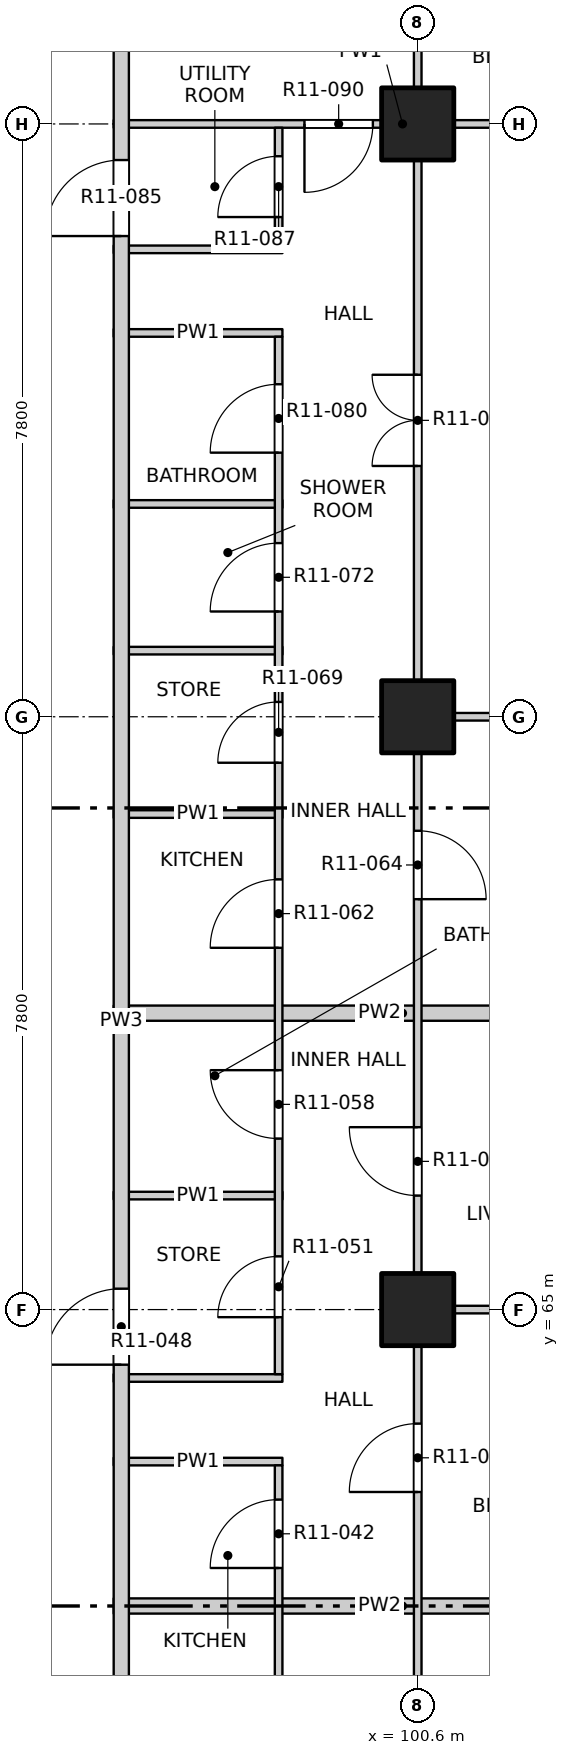
"""IFC4 building model, lengths in metres.
Left out: names, types, materials, properties, quantities, classifications, styles, units other than length and angle.
Written with IfcOpenShell. Run it as: python <this file> out.ifc"""

import sys

from ifc_helpers import new_model, si_unit, direction, frame, frame_2d, origin, origin_2d, place, context, subcontext, project, spatial, rectangle, extrude, element, fill, save


model = new_model("IFC4")
c1 = context("Model", 3, precision=1e-05, world=origin(), true_north=direction((0.0, 1.0)))
c2 = subcontext(c1, "Body", "Model", "MODEL_VIEW")
j1 = project(units=[si_unit("LENGTHUNIT", "METRE"), si_unit("PLANEANGLEUNIT", "RADIAN")], contexts=[c1])
p1 = place(None, origin())
s1 = spatial("IfcSite", under=j1, at=p1, CompositionType="ELEMENT")
p2 = place(p1, origin())
s2 = spatial("IfcBuilding", under=s1, at=p2, CompositionType="ELEMENT")
p3 = place(p2, frame((0.0, 0.0, 130.5)))
s3 = spatial("IfcBuildingStorey", under=s2, at=p3, CompositionType="ELEMENT", Elevation=130.5)
for number, where, z_axis, x_axis in (
    (1, (100.6, 65.0, -0.25), (0.0, 0.0, 1.0), (1.0, 0.0, 0.0)),
    (2, (100.6, 72.8, -0.25), (0.0, 0.0, 1.0), (1.0, 0.0, 0.0)),
    (3, (100.6, 80.6, -0.25), (0.0, 0.0, 1.0), (1.0, 0.0, 0.0)),
):
    element("IfcColumn", number, at=place(p3, frame(where, z_axis=z_axis, x_axis=x_axis)), inside=s3, PredefinedType="COLUMN", context=c2, shape_type="SweptSolid", body=[
        extrude(rectangle(XDim=0.95, YDim=0.95, at=origin_2d()), origin(), (0.0, 0.0, 1.0), 3.4),
    ])
p4 = place(p3, frame((96.6, 61.1, 0.0), z_axis=(0.0, 0.0, 1.0), x_axis=(1.0, 0.0, 0.0)))
e4 = element("IfcWall", 4, at=p4, inside=s3, PredefinedType="PARTITIONING", context=c2, shape_type="SweptSolid", body=[
    extrude(rectangle(XDim=7.6, YDim=0.2, at=frame_2d((3.8, 0.0))), origin(), (0.0, 0.0, 1.0), 2.55),
])
for number, where, z_axis, x_axis in (
    (5, (96.6, 63.0, 0.0), (0.0, 0.0, 1.0), (1.0, 0.0, 0.0)),
    (6, (96.6, 64.1, 0.0), (0.0, 0.0, 1.0), (1.0, 0.0, 0.0)),
):
    element("IfcWall", number, at=place(p3, frame(where, z_axis=z_axis, x_axis=x_axis)), inside=s3, PredefinedType="PARTITIONING", context=c2, shape_type="SweptSolid", body=[
        extrude(rectangle(XDim=2.22, YDim=0.1, at=frame_2d((1.11, 0.0))), origin(), (0.0, 0.0, 1.0), 3.15),
    ])
p5 = place(p3, frame((100.55, 65.0, 0.0), z_axis=(0.0, 0.0, 1.0), x_axis=(1.0, 0.0, 0.0)))
e7 = element("IfcWall", 7, at=p5, inside=s3, PredefinedType="PARTITIONING", context=c2, shape_type="SweptSolid", body=[
    extrude(rectangle(XDim=3.65, YDim=0.1, at=frame_2d((1.825, 0.0))), origin(), (0.0, 0.0, 1.0), 3.15),
])
p6 = place(p3, frame((96.6, 66.5, 0.0), z_axis=(0.0, 0.0, 1.0), x_axis=(1.0, 0.0, 0.0)))
e8 = element("IfcWall", 8, at=p6, inside=s3, PredefinedType="PARTITIONING", context=c2, shape_type="SweptSolid", body=[
    extrude(rectangle(XDim=2.22, YDim=0.1, at=frame_2d((1.11, 0.0))), origin(), (0.0, 0.0, 1.0), 3.15),
])
p7 = place(p3, frame((96.6, 68.9, 0.0), z_axis=(0.0, 0.0, 1.0), x_axis=(1.0, 0.0, 0.0)))
e9 = element("IfcWall", 9, at=p7, inside=s3, PredefinedType="PARTITIONING", context=c2, shape_type="SweptSolid", body=[
    extrude(rectangle(XDim=7.6, YDim=0.2, at=frame_2d((3.8, 0.0))), origin(), (0.0, 0.0, 1.0), 2.55),
])
p8 = place(p3, frame((96.6, 71.52, 0.0), z_axis=(0.0, 0.0, 1.0), x_axis=(1.0, 0.0, 0.0)))
e10 = element("IfcWall", 10, at=p8, inside=s3, PredefinedType="PARTITIONING", context=c2, shape_type="SweptSolid", body=[
    extrude(rectangle(XDim=2.22, YDim=0.1, at=frame_2d((1.11, 0.0))), origin(), (0.0, 0.0, 1.0), 3.15),
])
p9 = place(p3, frame((100.55, 72.8, 0.0), z_axis=(0.0, 0.0, 1.0), x_axis=(1.0, 0.0, 0.0)))
e11 = element("IfcWall", 11, at=p9, inside=s3, PredefinedType="PARTITIONING", context=c2, shape_type="SweptSolid", body=[
    extrude(rectangle(XDim=3.65, YDim=0.1, at=frame_2d((1.825, 0.0))), origin(), (0.0, 0.0, 1.0), 3.15),
])
for number, where, z_axis, x_axis in (
    (12, (96.6, 73.67, 0.0), (0.0, 0.0, 1.0), (1.0, 0.0, 0.0)),
    (13, (96.6, 75.6, 0.0), (0.0, 0.0, 1.0), (1.0, 0.0, 0.0)),
    (14, (96.6, 77.85, 0.0), (0.0, 0.0, 1.0), (1.0, 0.0, 0.0)),
    (15, (96.6, 78.95, 0.0), (0.0, 0.0, 1.0), (1.0, 0.0, 0.0)),
):
    element("IfcWall", number, at=place(p3, frame(where, z_axis=z_axis, x_axis=x_axis)), inside=s3, PredefinedType="PARTITIONING", context=c2, shape_type="SweptSolid", body=[
        extrude(rectangle(XDim=2.22, YDim=0.1, at=frame_2d((1.11, 0.0))), origin(), (0.0, 0.0, 1.0), 3.15),
    ])
p10 = place(p3, frame((96.6, 80.6, 0.0), z_axis=(0.0, 0.0, 1.0), x_axis=(1.0, 0.0, 0.0)))
e16 = element("IfcWall", 16, at=p10, inside=s3, PredefinedType="PARTITIONING", context=c2, shape_type="SweptSolid", body=[
    extrude(rectangle(XDim=7.6, YDim=0.1, at=frame_2d((3.8, 0.0))), origin(), (0.0, 0.0, 1.0), 3.15),
])
p11 = place(p10, frame((2.51, 0.0, 0.0)))
e17 = element("IfcOpeningElement", 17, at=p11, cuts=e16, PredefinedType="OPENING", context=c2, shape_type="SweptSolid", body=[
    extrude(rectangle(XDim=0.9, YDim=2.1, at=frame_2d((0.45, 1.05))), frame((0.0, 0.06, 0.0), z_axis=(0.0, -1.0, 0.0), x_axis=(1.0, 0.0, 0.0)), (0.0, 0.0, 1.0), 0.12),
])
p12 = place(p3, frame((96.7, 53.4, 0.0), z_axis=(0.0, 0.0, 1.0), x_axis=(0.0, 1.0, 0.0)))
e18 = element("IfcWall", 18, at=p12, inside=s3, PredefinedType="PARTITIONING", context=c2, shape_type="SweptSolid", body=[
    extrude(rectangle(XDim=30.8, YDim=0.2, at=frame_2d((15.4, 0.0))), origin(), (0.0, 0.0, 1.0), 3.15),
])
p13 = place(p12, frame((1.875, 0.0, 0.0)))
e19 = element("IfcOpeningElement", 19, at=p13, cuts=e18, PredefinedType="OPENING", context=c2, shape_type="SweptSolid", body=[
    extrude(rectangle(XDim=1.0, YDim=2.1, at=frame_2d((0.5, 1.05))), frame((0.0, 0.11, 0.0), z_axis=(0.0, -1.0, 0.0), x_axis=(1.0, 0.0, 0.0)), (0.0, 0.0, 1.0), 0.22),
])
p14 = place(p12, frame((10.875, 0.0, 0.0)))
e20 = element("IfcOpeningElement", 20, at=p14, cuts=e18, PredefinedType="OPENING", context=c2, shape_type="SweptSolid", body=[
    extrude(rectangle(XDim=1.0, YDim=2.1, at=frame_2d((0.5, 1.05))), frame((0.0, 0.11, 0.0), z_axis=(0.0, -1.0, 0.0), x_axis=(1.0, 0.0, 0.0)), (0.0, 0.0, 1.0), 0.22),
])
p15 = place(p12, frame((25.725, 0.0, 0.0)))
e21 = element("IfcOpeningElement", 21, at=p15, cuts=e18, PredefinedType="OPENING", context=c2, shape_type="SweptSolid", body=[
    extrude(rectangle(XDim=1.0, YDim=2.1, at=frame_2d((0.5, 1.05))), frame((0.0, 0.11, 0.0), z_axis=(0.0, -1.0, 0.0), x_axis=(1.0, 0.0, 0.0)), (0.0, 0.0, 1.0), 0.22),
])
p16 = place(p3, frame((98.77, 55.15, 0.0), z_axis=(0.0, 0.0, 1.0), x_axis=(0.0, 1.0, 0.0)))
e22 = element("IfcWall", 22, at=p16, inside=s3, PredefinedType="PARTITIONING", context=c2, shape_type="SweptSolid", body=[
    extrude(rectangle(XDim=7.8, YDim=0.1, at=frame_2d((3.9, 0.0))), origin(), (0.0, 0.0, 1.0), 3.15),
])
p17 = place(p16, frame((0.74, 0.0, 0.0)))
e23 = element("IfcOpeningElement", 23, at=p17, cuts=e22, PredefinedType="OPENING", context=c2, shape_type="SweptSolid", body=[
    extrude(rectangle(XDim=0.9, YDim=2.1, at=frame_2d((0.45, 1.05))), frame((0.0, 0.06, 0.0), z_axis=(0.0, -1.0, 0.0), x_axis=(1.0, 0.0, 0.0)), (0.0, 0.0, 1.0), 0.12),
])
p18 = place(p16, frame((3.74, 0.0, 0.0)))
e24 = element("IfcOpeningElement", 24, at=p18, cuts=e22, PredefinedType="OPENING", context=c2, shape_type="SweptSolid", body=[
    extrude(rectangle(XDim=0.9, YDim=2.1, at=frame_2d((0.45, 1.05))), frame((0.0, 0.06, 0.0), z_axis=(0.0, -1.0, 0.0), x_axis=(1.0, 0.0, 0.0)), (0.0, 0.0, 1.0), 0.12),
])
p19 = place(p16, frame((6.45, 0.0, 0.0)))
e25 = element("IfcOpeningElement", 25, at=p19, cuts=e22, PredefinedType="OPENING", context=c2, shape_type="SweptSolid", body=[
    extrude(rectangle(XDim=0.9, YDim=2.1, at=frame_2d((0.45, 1.05))), frame((0.0, 0.06, 0.0), z_axis=(0.0, -1.0, 0.0), x_axis=(1.0, 0.0, 0.0)), (0.0, 0.0, 1.0), 0.12),
])
p20 = place(p3, frame((98.77, 64.15, 0.0), z_axis=(0.0, 0.0, 1.0), x_axis=(0.0, 1.0, 0.0)))
e26 = element("IfcWall", 26, at=p20, inside=s3, PredefinedType="PARTITIONING", context=c2, shape_type="SweptSolid", body=[
    extrude(rectangle(XDim=13.65, YDim=0.1, at=frame_2d((6.825, 0.0))), origin(), (0.0, 0.0, 1.0), 3.15),
])
p21 = place(p20, frame((0.75, 0.0, 0.0)))
e27 = element("IfcOpeningElement", 27, at=p21, cuts=e26, PredefinedType="OPENING", context=c2, shape_type="SweptSolid", body=[
    extrude(rectangle(XDim=0.8, YDim=2.1, at=frame_2d((0.4, 1.05))), frame((0.0, 0.06, 0.0), z_axis=(0.0, -1.0, 0.0), x_axis=(1.0, 0.0, 0.0)), (0.0, 0.0, 1.0), 0.12),
])
p22 = place(p20, frame((3.1, 0.0, 0.0)))
e28 = element("IfcOpeningElement", 28, at=p22, cuts=e26, PredefinedType="OPENING", context=c2, shape_type="SweptSolid", body=[
    extrude(rectangle(XDim=0.9, YDim=2.1, at=frame_2d((0.45, 1.05))), frame((0.0, 0.06, 0.0), z_axis=(0.0, -1.0, 0.0), x_axis=(1.0, 0.0, 0.0)), (0.0, 0.0, 1.0), 0.12),
])
p23 = place(p20, frame((5.61, 0.0, 0.0)))
e29 = element("IfcOpeningElement", 29, at=p23, cuts=e26, PredefinedType="OPENING", context=c2, shape_type="SweptSolid", body=[
    extrude(rectangle(XDim=0.9, YDim=2.1, at=frame_2d((0.45, 1.05))), frame((0.0, 0.06, 0.0), z_axis=(0.0, -1.0, 0.0), x_axis=(1.0, 0.0, 0.0)), (0.0, 0.0, 1.0), 0.12),
])
p24 = place(p20, frame((8.045, 0.0, 0.0)))
e30 = element("IfcOpeningElement", 30, at=p24, cuts=e26, PredefinedType="OPENING", context=c2, shape_type="SweptSolid", body=[
    extrude(rectangle(XDim=0.8, YDim=2.1, at=frame_2d((0.4, 1.05))), frame((0.0, 0.06, 0.0), z_axis=(0.0, -1.0, 0.0), x_axis=(1.0, 0.0, 0.0)), (0.0, 0.0, 1.0), 0.12),
])
p25 = place(p20, frame((10.035, 0.0, 0.0)))
e31 = element("IfcOpeningElement", 31, at=p25, cuts=e26, PredefinedType="OPENING", context=c2, shape_type="SweptSolid", body=[
    extrude(rectangle(XDim=0.9, YDim=2.1, at=frame_2d((0.45, 1.05))), frame((0.0, 0.06, 0.0), z_axis=(0.0, -1.0, 0.0), x_axis=(1.0, 0.0, 0.0)), (0.0, 0.0, 1.0), 0.12),
])
p26 = place(p20, frame((12.125, 0.0, 0.0)))
e32 = element("IfcOpeningElement", 32, at=p26, cuts=e26, PredefinedType="OPENING", context=c2, shape_type="SweptSolid", body=[
    extrude(rectangle(XDim=0.9, YDim=2.1, at=frame_2d((0.45, 1.05))), frame((0.0, 0.06, 0.0), z_axis=(0.0, -1.0, 0.0), x_axis=(1.0, 0.0, 0.0)), (0.0, 0.0, 1.0), 0.12),
])
p27 = place(p3, frame((98.77, 79.0, 0.0), z_axis=(0.0, 0.0, 1.0), x_axis=(0.0, 1.0, 0.0)))
e33 = element("IfcWall", 33, at=p27, inside=s3, PredefinedType="PARTITIONING", context=c2, shape_type="SweptSolid", body=[
    extrude(rectangle(XDim=1.55, YDim=0.1, at=frame_2d((0.775, 0.0))), origin(), (0.0, 0.0, 1.0), 3.15),
])
p28 = place(p27, frame((0.375, 0.0, 0.0)))
e34 = element("IfcOpeningElement", 34, at=p28, cuts=e33, PredefinedType="OPENING", context=c2, shape_type="SweptSolid", body=[
    extrude(rectangle(XDim=0.8, YDim=2.1, at=frame_2d((0.4, 1.05))), frame((0.0, 0.06, 0.0), z_axis=(0.0, -1.0, 0.0), x_axis=(1.0, 0.0, 0.0)), (0.0, 0.0, 1.0), 0.12),
])
p29 = place(p3, frame((100.6, 45.8, 0.0), z_axis=(0.0, 0.0, 1.0), x_axis=(0.0, 1.0, 0.0)))
e35 = element("IfcWall", 35, at=p29, inside=s3, PredefinedType="PARTITIONING", context=c2, shape_type="SweptSolid", body=[
    extrude(rectangle(XDim=38.4, YDim=0.1, at=frame_2d((19.2, 0.0))), origin(), (0.0, 0.0, 1.0), 3.15),
])
p30 = place(p29, frame((1.05, 0.0, 0.0)))
e36 = element("IfcOpeningElement", 36, at=p30, cuts=e35, PredefinedType="OPENING", context=c2, shape_type="SweptSolid", body=[
    extrude(rectangle(XDim=1.2, YDim=2.1, at=frame_2d((0.6, 1.05))), frame((0.0, 0.06, 0.0), z_axis=(0.0, -1.0, 0.0), x_axis=(1.0, 0.0, 0.0)), (0.0, 0.0, 1.0), 0.12),
])
p31 = place(p29, frame((5.1, 0.0, 0.0)))
e37 = element("IfcOpeningElement", 37, at=p31, cuts=e35, PredefinedType="OPENING", context=c2, shape_type="SweptSolid", body=[
    extrude(rectangle(XDim=0.9, YDim=2.1, at=frame_2d((0.45, 1.05))), frame((0.0, 0.06, 0.0), z_axis=(0.0, -1.0, 0.0), x_axis=(1.0, 0.0, 0.0)), (0.0, 0.0, 1.0), 0.12),
])
p32 = place(p29, frame((9.0, 0.0, 0.0)))
e38 = element("IfcOpeningElement", 38, at=p32, cuts=e35, PredefinedType="OPENING", context=c2, shape_type="SweptSolid", body=[
    extrude(rectangle(XDim=0.9, YDim=2.1, at=frame_2d((0.45, 1.05))), frame((0.0, 0.06, 0.0), z_axis=(0.0, -1.0, 0.0), x_axis=(1.0, 0.0, 0.0)), (0.0, 0.0, 1.0), 0.12),
])
p33 = place(p29, frame((12.9, 0.0, 0.0)))
e39 = element("IfcOpeningElement", 39, at=p33, cuts=e35, PredefinedType="OPENING", context=c2, shape_type="SweptSolid", body=[
    extrude(rectangle(XDim=0.9, YDim=2.1, at=frame_2d((0.45, 1.05))), frame((0.0, 0.06, 0.0), z_axis=(0.0, -1.0, 0.0), x_axis=(1.0, 0.0, 0.0)), (0.0, 0.0, 1.0), 0.12),
])
p34 = place(p29, frame((16.8, 0.0, 0.0)))
e40 = element("IfcOpeningElement", 40, at=p34, cuts=e35, PredefinedType="OPENING", context=c2, shape_type="SweptSolid", body=[
    extrude(rectangle(XDim=0.9, YDim=2.1, at=frame_2d((0.45, 1.05))), frame((0.0, 0.06, 0.0), z_axis=(0.0, -1.0, 0.0), x_axis=(1.0, 0.0, 0.0)), (0.0, 0.0, 1.0), 0.12),
])
p35 = place(p29, frame((20.7, 0.0, 0.0)))
e41 = element("IfcOpeningElement", 41, at=p35, cuts=e35, PredefinedType="OPENING", context=c2, shape_type="SweptSolid", body=[
    extrude(rectangle(XDim=0.9, YDim=2.1, at=frame_2d((0.45, 1.05))), frame((0.0, 0.06, 0.0), z_axis=(0.0, -1.0, 0.0), x_axis=(1.0, 0.0, 0.0)), (0.0, 0.0, 1.0), 0.12),
])
p36 = place(p29, frame((24.6, 0.0, 0.0)))
e42 = element("IfcOpeningElement", 42, at=p36, cuts=e35, PredefinedType="OPENING", context=c2, shape_type="SweptSolid", body=[
    extrude(rectangle(XDim=0.9, YDim=2.1, at=frame_2d((0.45, 1.05))), frame((0.0, 0.06, 0.0), z_axis=(0.0, -1.0, 0.0), x_axis=(1.0, 0.0, 0.0)), (0.0, 0.0, 1.0), 0.12),
])
p37 = place(p29, frame((30.3, 0.0, 0.0)))
e43 = element("IfcOpeningElement", 43, at=p37, cuts=e35, PredefinedType="OPENING", context=c2, shape_type="SweptSolid", body=[
    extrude(rectangle(XDim=1.2, YDim=2.1, at=frame_2d((0.6, 1.05))), frame((0.0, 0.06, 0.0), z_axis=(0.0, -1.0, 0.0), x_axis=(1.0, 0.0, 0.0)), (0.0, 0.0, 1.0), 0.12),
])
p38 = place(p29, frame((36.15, 0.0, 0.0)))
e44 = element("IfcOpeningElement", 44, at=p38, cuts=e35, PredefinedType="OPENING", context=c2, shape_type="SweptSolid", body=[
    extrude(rectangle(XDim=1.2, YDim=2.1, at=frame_2d((0.6, 1.05))), frame((0.0, 0.06, 0.0), z_axis=(0.0, -1.0, 0.0), x_axis=(1.0, 0.0, 0.0)), (0.0, 0.0, 1.0), 0.12),
])
p39 = place(p19, origin())
e45 = element("IfcDoor", 45, at=p39, inside=s3, OperationType="SINGLE_SWING_LEFT", PredefinedType="DOOR", context=c2, shape_type="SweptSolid", body=[
    extrude(rectangle(XDim=0.9, YDim=2.1, at=frame_2d((0.45, 1.05))), frame((0.0, 0.025, 0.0), z_axis=(0.0, -1.0, 0.0), x_axis=(1.0, 0.0, 0.0)), (0.0, 0.0, 1.0), 0.05),
])
fill(e25, e45)
p40 = place(p34, origin())
e46 = element("IfcDoor", 46, at=p40, inside=s3, OperationType="SINGLE_SWING_LEFT", PredefinedType="DOOR", context=c2, shape_type="SweptSolid", body=[
    extrude(rectangle(XDim=0.9, YDim=2.1, at=frame_2d((0.45, 1.05))), frame((0.0, 0.025, 0.0), z_axis=(0.0, -1.0, 0.0), x_axis=(1.0, 0.0, 0.0)), (0.0, 0.0, 1.0), 0.05),
])
fill(e40, e46)
p41 = place(p14, origin())
e47 = element("IfcDoor", 47, at=p41, inside=s3, OperationType="SINGLE_SWING_LEFT", PredefinedType="DOOR", context=c2, shape_type="SweptSolid", body=[
    extrude(rectangle(XDim=1.0, YDim=2.1, at=frame_2d((0.5, 1.05))), frame((0.0, 0.025, 0.0), z_axis=(0.0, -1.0, 0.0), x_axis=(1.0, 0.0, 0.0)), (0.0, 0.0, 1.0), 0.05),
])
fill(e20, e47)
p42 = place(p21, origin())
e48 = element("IfcDoor", 48, at=p42, inside=s3, OperationType="SINGLE_SWING_LEFT", PredefinedType="DOOR", context=c2, shape_type="SweptSolid", body=[
    extrude(rectangle(XDim=0.8, YDim=2.1, at=frame_2d((0.4, 1.05))), frame((0.0, 0.025, 0.0), z_axis=(0.0, -1.0, 0.0), x_axis=(1.0, 0.0, 0.0)), (0.0, 0.0, 1.0), 0.05),
])
fill(e27, e48)
p43 = place(p35, origin())
e49 = element("IfcDoor", 49, at=p43, inside=s3, OperationType="SINGLE_SWING_RIGHT", PredefinedType="DOOR", context=c2, shape_type="SweptSolid", body=[
    extrude(rectangle(XDim=0.9, YDim=2.1, at=frame_2d((0.45, 1.05))), frame((0.0, 0.025, 0.0), z_axis=(0.0, -1.0, 0.0), x_axis=(1.0, 0.0, 0.0)), (0.0, 0.0, 1.0), 0.05),
])
fill(e41, e49)
p44 = place(p22, origin())
e50 = element("IfcDoor", 50, at=p44, inside=s3, OperationType="SINGLE_SWING_RIGHT", PredefinedType="DOOR", context=c2, shape_type="SweptSolid", body=[
    extrude(rectangle(XDim=0.9, YDim=2.1, at=frame_2d((0.45, 1.05))), frame((0.0, 0.025, 0.0), z_axis=(0.0, -1.0, 0.0), x_axis=(1.0, 0.0, 0.0)), (0.0, 0.0, 1.0), 0.05),
])
fill(e28, e50)
p45 = place(p23, origin())
e51 = element("IfcDoor", 51, at=p45, inside=s3, OperationType="SINGLE_SWING_LEFT", PredefinedType="DOOR", context=c2, shape_type="SweptSolid", body=[
    extrude(rectangle(XDim=0.9, YDim=2.1, at=frame_2d((0.45, 1.05))), frame((0.0, 0.025, 0.0), z_axis=(0.0, -1.0, 0.0), x_axis=(1.0, 0.0, 0.0)), (0.0, 0.0, 1.0), 0.05),
])
fill(e29, e51)
p46 = place(p36, origin())
e52 = element("IfcDoor", 52, at=p46, inside=s3, OperationType="SINGLE_SWING_RIGHT", PredefinedType="DOOR", context=c2, shape_type="SweptSolid", body=[
    extrude(rectangle(XDim=0.9, YDim=2.1, at=frame_2d((0.45, 1.05))), frame((0.0, 0.025, 0.0), z_axis=(0.0, -1.0, 0.0), x_axis=(1.0, 0.0, 0.0)), (0.0, 0.0, 1.0), 0.05),
])
fill(e42, e52)
p47 = place(p24, origin())
e53 = element("IfcDoor", 53, at=p47, inside=s3, OperationType="SINGLE_SWING_LEFT", PredefinedType="DOOR", context=c2, shape_type="SweptSolid", body=[
    extrude(rectangle(XDim=0.8, YDim=2.1, at=frame_2d((0.4, 1.05))), frame((0.0, 0.025, 0.0), z_axis=(0.0, -1.0, 0.0), x_axis=(1.0, 0.0, 0.0)), (0.0, 0.0, 1.0), 0.05),
])
fill(e30, e53)
p48 = place(p25, origin())
e54 = element("IfcDoor", 54, at=p48, inside=s3, OperationType="SINGLE_SWING_LEFT", PredefinedType="DOOR", context=c2, shape_type="SweptSolid", body=[
    extrude(rectangle(XDim=0.9, YDim=2.1, at=frame_2d((0.45, 1.05))), frame((0.0, 0.025, 0.0), z_axis=(0.0, -1.0, 0.0), x_axis=(1.0, 0.0, 0.0)), (0.0, 0.0, 1.0), 0.05),
])
fill(e31, e54)
p49 = place(p37, origin())
e55 = element("IfcDoor", 55, at=p49, inside=s3, OperationType="DOUBLE_DOOR_SINGLE_SWING", PredefinedType="DOOR", context=c2, shape_type="SweptSolid", body=[
    extrude(rectangle(XDim=1.2, YDim=2.1, at=frame_2d((0.6, 1.05))), frame((0.0, 0.025, 0.0), z_axis=(0.0, -1.0, 0.0), x_axis=(1.0, 0.0, 0.0)), (0.0, 0.0, 1.0), 0.05),
])
fill(e43, e55)
p50 = place(p26, origin())
e56 = element("IfcDoor", 56, at=p50, inside=s3, OperationType="SINGLE_SWING_LEFT", PredefinedType="DOOR", context=c2, shape_type="SweptSolid", body=[
    extrude(rectangle(XDim=0.9, YDim=2.1, at=frame_2d((0.45, 1.05))), frame((0.0, 0.025, 0.0), z_axis=(0.0, -1.0, 0.0), x_axis=(1.0, 0.0, 0.0)), (0.0, 0.0, 1.0), 0.05),
])
fill(e32, e56)
p51 = place(p15, origin())
e57 = element("IfcDoor", 57, at=p51, inside=s3, OperationType="SINGLE_SWING_LEFT", PredefinedType="DOOR", context=c2, shape_type="SweptSolid", body=[
    extrude(rectangle(XDim=1.0, YDim=2.1, at=frame_2d((0.5, 1.05))), frame((0.0, 0.025, 0.0), z_axis=(0.0, -1.0, 0.0), x_axis=(1.0, 0.0, 0.0)), (0.0, 0.0, 1.0), 0.05),
])
fill(e21, e57)
p52 = place(p28, origin())
e58 = element("IfcDoor", 58, at=p52, inside=s3, OperationType="SINGLE_SWING_LEFT", PredefinedType="DOOR", context=c2, shape_type="SweptSolid", body=[
    extrude(rectangle(XDim=0.8, YDim=2.1, at=frame_2d((0.4, 1.05))), frame((0.0, 0.025, 0.0), z_axis=(0.0, -1.0, 0.0), x_axis=(1.0, 0.0, 0.0)), (0.0, 0.0, 1.0), 0.05),
])
fill(e34, e58)
p53 = place(p11, origin())
e59 = element("IfcDoor", 59, at=p53, inside=s3, OperationType="SINGLE_SWING_RIGHT", PredefinedType="DOOR", context=c2, shape_type="SweptSolid", body=[
    extrude(rectangle(XDim=0.9, YDim=2.1, at=frame_2d((0.45, 1.05))), frame((0.0, 0.025, 0.0), z_axis=(0.0, -1.0, 0.0), x_axis=(1.0, 0.0, 0.0)), (0.0, 0.0, 1.0), 0.05),
])
fill(e17, e59)
save(model, sys.argv[1])
